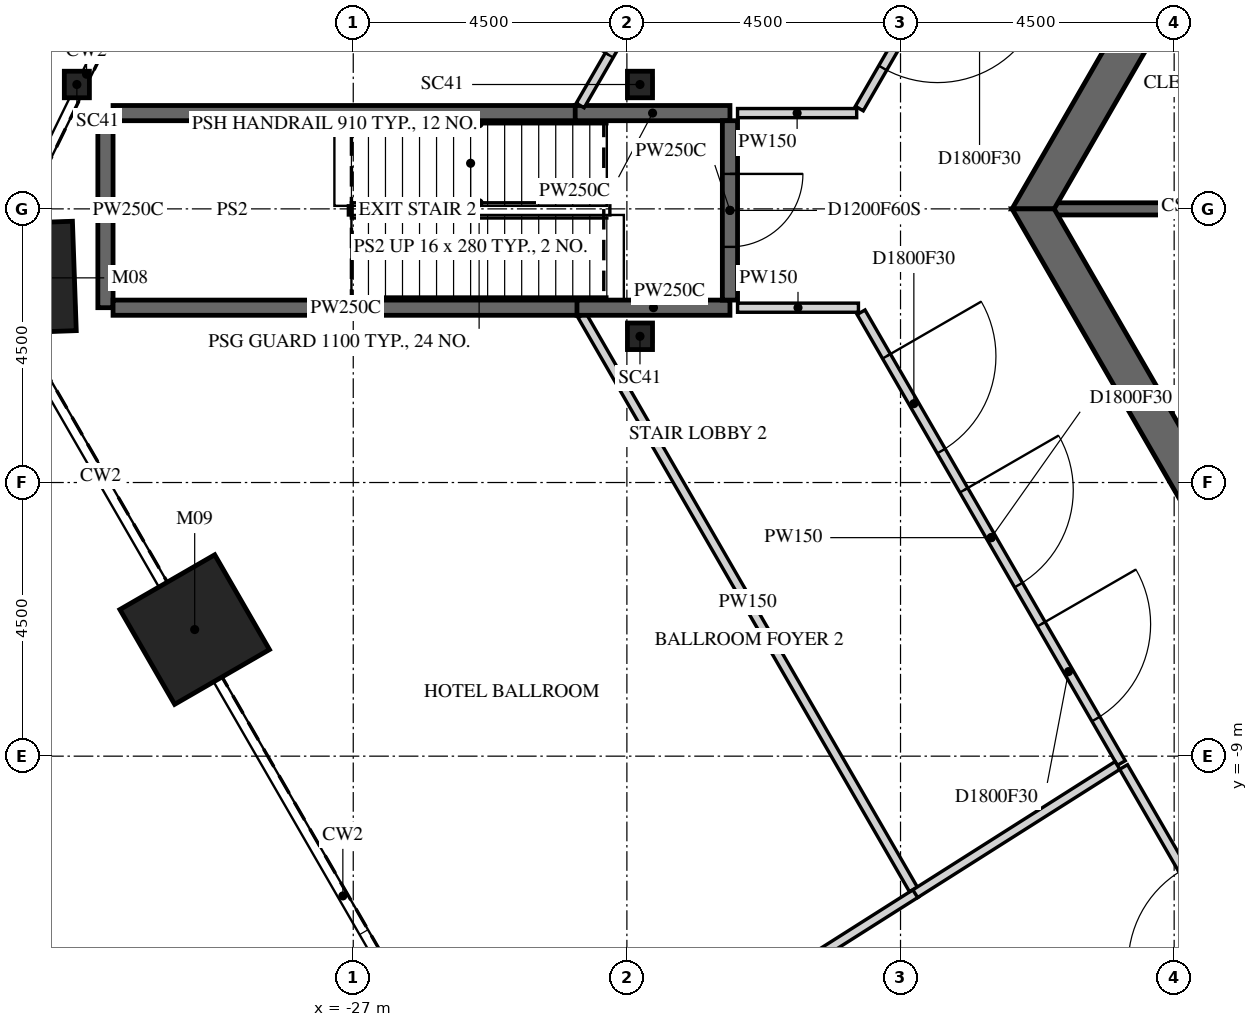
"""IFC4 building model, lengths in metres.
Left out: names, types, materials, properties, quantities, classifications, styles, units other than length and angle.
Written with IfcOpenShell. Run it as: python <this file> out.ifc"""

import sys

from ifc_helpers import new_model, si_unit, direction, frame, frame_2d, origin, origin_2d, place, context, subcontext, project, spatial, polyline, rectangle, i_section, outline, extrude, element, fill, save


model = new_model("IFC4")
c1 = context("Model", 3, precision=1e-05, world=origin(), true_north=direction((0.0, 1.0)))
c2 = subcontext(c1, "Body", "Model", "MODEL_VIEW")
j1 = project(units=[si_unit("LENGTHUNIT", "METRE"), si_unit("PLANEANGLEUNIT", "RADIAN")], contexts=[c1])
p1 = place(None, origin())
s1 = spatial("IfcSite", under=j1, at=p1, CompositionType="ELEMENT")
p2 = place(p1, origin())
s2 = spatial("IfcBuilding", under=s1, at=p2, CompositionType="ELEMENT")
p3 = place(p2, frame((0.0, 0.0, 15.0)))
s3 = spatial("IfcBuildingStorey", under=s2, at=p3, CompositionType="ELEMENT", Elevation=15.0)
for number, where, z_axis, x_axis in (
    (1, (-32.486, -1.135, -0.25), (0.0, 0.0, 1.0), (-0.035, 0.999, 0.0)),
    (2, (-29.608, -6.918, -0.25), (0.0, 0.0, 1.0), (-0.5, 0.866, 0.0)),
):
    element("IfcColumn", number, at=place(p3, frame(where, z_axis=z_axis, x_axis=x_axis)), inside=s3, PredefinedType="COLUMN", context=c2, shape_type="SweptSolid", body=[
        extrude(rectangle(XDim=1.8, YDim=1.8, at=origin_2d()), origin(), (0.0, 0.0, 1.0), 5.5),
    ])
for number, where, z_axis, x_axis in (
    (3, (-31.545, 2.045, -0.25), (0.0, 0.0, 1.0), (1.0, 0.0, 0.0)),
    (4, (-22.285, 2.045, -0.25), (0.0, 0.0, 1.0), (1.0, 0.0, 0.0)),
    (5, (-22.285, -2.095, -0.25), (0.0, 0.0, 1.0), (1.0, 0.0, 0.0)),
):
    element("IfcColumn", number, at=place(p3, frame(where, z_axis=z_axis, x_axis=x_axis)), inside=s3, PredefinedType="COLUMN", context=c2, shape_type="SweptSolid", body=[
        extrude(i_section(OverallWidth=0.412, OverallDepth=0.437, WebThickness=0.036, FlangeThickness=0.058, FilletRadius=0.015, at=origin_2d()), origin(), (0.0, 0.0, 1.0), 5.5),
    ])
p4 = place(p3, frame((-7.91, 13.7, -0.25), z_axis=(0.0, 0.0, 1.0), x_axis=(-0.499999880136, -0.866025472988, 0.0)))
e6 = element("IfcWall", 6, at=p4, inside=s3, PredefinedType="SHEAR", context=c2, shape_type="SweptSolid", body=[
    extrude(outline(polyline([(-0.173, -0.3), (15.993, -0.3), (15.646, 0.3), (0.173, 0.3), (-0.173, -0.3)])), origin(), (0.0, 0.0, 1.0), 5.5),
])
p5 = place(p4, frame((7.039, 0.0, 0.25)))
e7 = element("IfcOpeningElement", 7, at=p5, cuts=e6, PredefinedType="OPENING", context=c2, shape_type="SweptSolid", body=[
    extrude(rectangle(XDim=1.8, YDim=2.4, at=frame_2d((0.9, 1.2))), frame((0.0, 0.31, 0.0), z_axis=(0.0, -1.0, 0.0), x_axis=(1.0, 0.0, 0.0)), (0.0, 0.0, 1.0), 0.62),
])
p6 = place(p3, frame((-15.819, 0.0, -0.25), z_axis=(0.0, 0.0, 1.0), x_axis=(0.499999880136, -0.866025472988, 0.0)))
e8 = element("IfcWall", 8, at=p6, inside=s3, PredefinedType="SHEAR", context=c2, shape_type="SweptSolid", body=[
    extrude(outline(polyline([(-0.173, -0.3), (15.993, -0.3), (15.646, 0.3), (0.173, 0.3), (-0.173, -0.3)])), origin(), (0.0, 0.0, 1.0), 5.5),
])
p7 = place(p6, frame((6.981, 0.0, 0.25)))
e9 = element("IfcOpeningElement", 9, at=p7, cuts=e8, PredefinedType="OPENING", context=c2, shape_type="SweptSolid", body=[
    extrude(rectangle(XDim=1.8, YDim=2.4, at=frame_2d((0.9, 1.2))), frame((0.0, 0.31, 0.0), z_axis=(0.0, -1.0, 0.0), x_axis=(1.0, 0.0, 0.0)), (0.0, 0.0, 1.0), 0.62),
])
p8 = place(p3, frame((-11.547, 0.0, -0.25), z_axis=(0.0, 0.0, 1.0), x_axis=(-1.0, 0.0, 0.0)))
e10 = element("IfcWall", 10, at=p8, inside=s3, PredefinedType="SHEAR", context=c2, shape_type="SweptSolid", body=[
    extrude(rectangle(XDim=3.926, YDim=0.2, at=frame_2d((1.963, 0.0))), origin(), (0.0, 0.0, 1.0), 5.5),
])
p9 = place(p3, frame((-31.075, -1.625, 0.0), z_axis=(0.0, 0.0, 1.0), x_axis=(0.0, 1.0, 0.0)))
e11 = element("IfcWall", 11, at=p9, inside=s3, PredefinedType="PARTITIONING", context=c2, shape_type="SweptSolid", body=[
    extrude(rectangle(XDim=3.2, YDim=0.25, at=frame_2d((1.6, 0.0))), origin(), (0.0, 0.0, 1.0), 5.25),
])
p10 = place(p3, frame((-30.95, 1.575, 0.0), z_axis=(0.0, 0.0, 1.0), x_axis=(1.0, 0.0, 0.0)))
e12 = element("IfcWall", 12, at=p10, inside=s3, PredefinedType="PARTITIONING", context=c2, shape_type="SweptSolid", body=[
    extrude(rectangle(XDim=7.622, YDim=0.25, at=frame_2d((3.811, 0.0))), origin(), (0.0, 0.0, 1.0), 5.25),
])
p11 = place(p3, frame((-24.596, -15.599, 0.0), z_axis=(0.0, 0.0, 1.0), x_axis=(0.844468094915, 0.535605859445, 0.0)))
e13 = element("IfcWall", 13, at=p11, inside=s3, PredefinedType="PARTITIONING", context=c2, shape_type="SweptSolid", body=[
    extrude(rectangle(XDim=8.116, YDim=0.15, at=frame_2d((4.058, 0.0))), origin(), (0.0, 0.0, 1.0), 4.496),
])
p12 = place(p3, frame((-23.35, 1.575, 0.0), z_axis=(0.0, 0.0, 1.0), x_axis=(1.0, 0.0, 0.0)))
e14 = element("IfcWall", 14, at=p12, inside=s3, PredefinedType="PARTITIONING", context=c2, shape_type="SweptSolid", body=[
    extrude(rectangle(XDim=2.545, YDim=0.25, at=frame_2d((1.272, 0.0))), origin(), (0.0, 0.0, 1.0), 5.25),
])
p13 = place(p3, frame((-23.239, -1.75, 0.0), z_axis=(0.0, 0.0, 1.0), x_axis=(0.499992537871, -0.866029712004, 0.0)))
e15 = element("IfcWall", 15, at=p13, inside=s3, PredefinedType="PARTITIONING", context=c2, shape_type="SweptSolid", body=[
    extrude(rectangle(XDim=10.903, YDim=0.15, at=frame_2d((5.451, 0.0))), origin(), (0.0, 0.0, 1.0), 5.25),
])
p14 = place(p3, frame((-23.299, -1.625, 0.0), z_axis=(0.0, 0.0, 1.0), x_axis=(-1.0, 0.0, 0.0)))
e16 = element("IfcWall", 16, at=p14, inside=s3, PredefinedType="PARTITIONING", context=c2, shape_type="SweptSolid", body=[
    extrude(rectangle(XDim=7.651, YDim=0.25, at=frame_2d((3.825, 0.0))), origin(), (0.0, 0.0, 1.0), 5.25),
])
p15 = place(p3, frame((-20.805, -1.625, 0.0), z_axis=(0.0, 0.0, 1.0), x_axis=(-1.0, 0.0, 0.0)))
e17 = element("IfcWall", 17, at=p15, inside=s3, PredefinedType="PARTITIONING", context=c2, shape_type="SweptSolid", body=[
    extrude(rectangle(XDim=2.516, YDim=0.25, at=frame_2d((1.258, 0.0))), origin(), (0.0, 0.0, 1.0), 5.25),
])
p16 = place(p3, frame((-20.805, 1.45, 0.0), z_axis=(0.0, 0.0, 1.0), x_axis=(0.0, -1.0, 0.0)))
e18 = element("IfcWall", 18, at=p16, inside=s3, PredefinedType="PARTITIONING", context=c2, shape_type="SweptSolid", body=[
    extrude(rectangle(XDim=2.95, YDim=0.25, at=frame_2d((1.475, 0.0))), origin(), (0.0, 0.0, 1.0), 5.25),
])
p17 = place(p16, frame((0.875, 0.0, 0.0)))
e19 = element("IfcOpeningElement", 19, at=p17, cuts=e18, PredefinedType="OPENING", context=c2, shape_type="SweptSolid", body=[
    extrude(rectangle(XDim=1.2, YDim=2.1, at=frame_2d((0.6, 1.05))), frame((0.0, 0.135, 0.0), z_axis=(0.0, -1.0, 0.0), x_axis=(1.0, 0.0, 0.0)), (0.0, 0.0, 1.0), 0.27),
])
p18 = place(p3, frame((-20.68, 1.575, 0.0), z_axis=(0.0, 0.0, 1.0), x_axis=(1.0, 0.0, 0.0)))
e20 = element("IfcWall", 20, at=p18, inside=s3, PredefinedType="PARTITIONING", context=c2, shape_type="SweptSolid", body=[
    extrude(rectangle(XDim=1.959, YDim=0.15, at=frame_2d((0.979, 0.0))), origin(), (0.0, 0.0, 1.0), 5.25),
])
p19 = place(p3, frame((-18.692, -1.625, 0.0), z_axis=(0.0, 0.0, 1.0), x_axis=(-1.0, 0.0, 0.0)))
e21 = element("IfcWall", 21, at=p19, inside=s3, PredefinedType="PARTITIONING", context=c2, shape_type="SweptSolid", body=[
    extrude(rectangle(XDim=1.988, YDim=0.15, at=frame_2d((0.994, 0.0))), origin(), (0.0, 0.0, 1.0), 5.25),
])
p20 = place(p3, frame((-18.649, -1.7, 0.0), z_axis=(0.0, 0.0, 1.0), x_axis=(0.499985805234, -0.866033598981, 0.0)))
e22 = element("IfcWall", 22, at=p20, inside=s3, PredefinedType="PARTITIONING", context=c2, shape_type="SweptSolid", body=[
    extrude(rectangle(XDim=8.56, YDim=0.15, at=frame_2d((4.28, 0.0))), origin(), (0.0, 0.0, 1.0), 5.25),
])
p21 = place(p20, frame((0.836, 0.0, 0.0)))
e23 = element("IfcOpeningElement", 23, at=p21, cuts=e22, PredefinedType="OPENING", context=c2, shape_type="SweptSolid", body=[
    extrude(rectangle(XDim=1.8, YDim=2.1, at=frame_2d((0.9, 1.05))), frame((0.0, 0.085, 0.0), z_axis=(0.0, -1.0, 0.0), x_axis=(1.0, 0.0, 0.0)), (0.0, 0.0, 1.0), 0.17),
])
p22 = place(p20, frame((3.38, 0.0, 0.0)))
e24 = element("IfcOpeningElement", 24, at=p22, cuts=e22, PredefinedType="OPENING", context=c2, shape_type="SweptSolid", body=[
    extrude(rectangle(XDim=1.8, YDim=2.1, at=frame_2d((0.9, 1.05))), frame((0.0, 0.085, 0.0), z_axis=(0.0, -1.0, 0.0), x_axis=(1.0, 0.0, 0.0)), (0.0, 0.0, 1.0), 0.17),
])
p23 = place(p20, frame((5.924, 0.0, 0.0)))
e25 = element("IfcOpeningElement", 25, at=p23, cuts=e22, PredefinedType="OPENING", context=c2, shape_type="SweptSolid", body=[
    extrude(rectangle(XDim=1.8, YDim=2.1, at=frame_2d((0.9, 1.05))), frame((0.0, 0.085, 0.0), z_axis=(0.0, -1.0, 0.0), x_axis=(1.0, 0.0, 0.0)), (0.0, 0.0, 1.0), 0.17),
])
p24 = place(p3, frame((-17.758, -11.262, 0.0), z_axis=(0.0, 0.0, 1.0), x_axis=(0.844546191186, 0.53548270836, 0.0)))
e26 = element("IfcWall", 26, at=p24, inside=s3, PredefinedType="PARTITIONING", context=c2, shape_type="SweptSolid", body=[
    extrude(rectangle(XDim=3.938, YDim=0.15, at=frame_2d((1.969, 0.0))), origin(), (0.0, 0.0, 1.0), 4.496),
])
p25 = place(p3, frame((-23.268, 1.7, 0.0), z_axis=(0.0, 0.0, 1.0), x_axis=(0.500054871588, 0.86599372134, 0.0)))
e27 = element("IfcWall", 27, at=p25, inside=s3, PredefinedType="PARTITIONING", context=c2, shape_type="SweptSolid", body=[
    extrude(rectangle(XDim=11.634, YDim=0.15, at=frame_2d((5.817, 0.0))), origin(), (0.0, 0.0, 1.0), 5.25),
])
p26 = place(p25, frame((8.879, 0.0, 0.0)))
e28 = element("IfcOpeningElement", 28, at=p26, cuts=e27, PredefinedType="OPENING", context=c2, shape_type="SweptSolid", body=[
    extrude(rectangle(XDim=1.8, YDim=2.1, at=frame_2d((0.9, 1.05))), frame((0.0, 0.085, 0.0), z_axis=(0.0, -1.0, 0.0), x_axis=(1.0, 0.0, 0.0)), (0.0, 0.0, 1.0), 0.17),
])
p27 = place(p25, frame((6.804, 0.0, 0.0)))
e29 = element("IfcOpeningElement", 29, at=p27, cuts=e27, PredefinedType="OPENING", context=c2, shape_type="SweptSolid", body=[
    extrude(rectangle(XDim=1.8, YDim=2.1, at=frame_2d((0.9, 1.05))), frame((0.0, 0.085, 0.0), z_axis=(0.0, -1.0, 0.0), x_axis=(1.0, 0.0, 0.0)), (0.0, 0.0, 1.0), 0.17),
])
p28 = place(p25, frame((4.854, 0.0, 0.0)))
e30 = element("IfcOpeningElement", 30, at=p28, cuts=e27, PredefinedType="OPENING", context=c2, shape_type="SweptSolid", body=[
    extrude(rectangle(XDim=1.8, YDim=2.1, at=frame_2d((0.9, 1.05))), frame((0.0, 0.085, 0.0), z_axis=(0.0, -1.0, 0.0), x_axis=(1.0, 0.0, 0.0)), (0.0, 0.0, 1.0), 0.17),
])
p29 = place(p25, frame((2.904, 0.0, 0.0)))
e31 = element("IfcOpeningElement", 31, at=p29, cuts=e27, PredefinedType="OPENING", context=c2, shape_type="SweptSolid", body=[
    extrude(rectangle(XDim=1.8, YDim=2.1, at=frame_2d((0.9, 1.05))), frame((0.0, 0.085, 0.0), z_axis=(0.0, -1.0, 0.0), x_axis=(1.0, 0.0, 0.0)), (0.0, 0.0, 1.0), 0.17),
])
p30 = place(p25, frame((0.955, 0.0, 0.0)))
e32 = element("IfcOpeningElement", 32, at=p30, cuts=e27, PredefinedType="OPENING", context=c2, shape_type="SweptSolid", body=[
    extrude(rectangle(XDim=1.8, YDim=2.1, at=frame_2d((0.9, 1.05))), frame((0.0, 0.085, 0.0), z_axis=(0.0, -1.0, 0.0), x_axis=(1.0, 0.0, 0.0)), (0.0, 0.0, 1.0), 0.17),
])
p31 = place(p3, frame((-14.723, 8.5, 0.0), z_axis=(0.0, 0.0, 1.0), x_axis=(-0.499993197506, -0.86602933117, 0.0)))
e33 = element("IfcWall", 33, at=p31, inside=s3, PredefinedType="PARTITIONING", context=c2, shape_type="SweptSolid", body=[
    extrude(rectangle(XDim=7.91, YDim=0.15, at=frame_2d((3.955, 0.0))), origin(), (0.0, 0.0, 1.0), 5.25),
])
p32 = place(p31, frame((0.771, 0.0, 0.0)))
e34 = element("IfcOpeningElement", 34, at=p32, cuts=e33, PredefinedType="OPENING", context=c2, shape_type="SweptSolid", body=[
    extrude(rectangle(XDim=1.8, YDim=2.1, at=frame_2d((0.9, 1.05))), frame((0.0, 0.085, 0.0), z_axis=(0.0, -1.0, 0.0), x_axis=(1.0, 0.0, 0.0)), (0.0, 0.0, 1.0), 0.17),
])
p33 = place(p31, frame((3.055, 0.0, 0.0)))
e35 = element("IfcOpeningElement", 35, at=p33, cuts=e33, PredefinedType="OPENING", context=c2, shape_type="SweptSolid", body=[
    extrude(rectangle(XDim=1.8, YDim=2.1, at=frame_2d((0.9, 1.05))), frame((0.0, 0.085, 0.0), z_axis=(0.0, -1.0, 0.0), x_axis=(1.0, 0.0, 0.0)), (0.0, 0.0, 1.0), 0.17),
])
p34 = place(p31, frame((5.339, 0.0, 0.0)))
e36 = element("IfcOpeningElement", 36, at=p34, cuts=e33, PredefinedType="OPENING", context=c2, shape_type="SweptSolid", body=[
    extrude(rectangle(XDim=1.8, YDim=2.1, at=frame_2d((0.9, 1.05))), frame((0.0, 0.085, 0.0), z_axis=(0.0, -1.0, 0.0), x_axis=(1.0, 0.0, 0.0)), (0.0, 0.0, 1.0), 0.17),
])
p35 = place(p3, frame((-11.481, -14.114, 0.0), z_axis=(0.0, 0.0, 1.0), x_axis=(-0.500049947645, 0.865996564577, 0.0)))
e37 = element("IfcWall", 37, at=p35, inside=s3, PredefinedType="PARTITIONING", context=c2, shape_type="SweptSolid", body=[
    extrude(rectangle(XDim=5.7, YDim=0.15, at=frame_2d((2.85, 0.0))), origin(), (0.0, 0.0, 1.0), 5.25),
])
p36 = place(p35, frame((1.95, 0.0, 0.0)))
e38 = element("IfcOpeningElement", 38, at=p36, cuts=e37, PredefinedType="OPENING", context=c2, shape_type="SweptSolid", body=[
    extrude(rectangle(XDim=1.8, YDim=2.1, at=frame_2d((0.9, 1.05))), frame((0.0, 0.085, 0.0), z_axis=(0.0, -1.0, 0.0), x_axis=(1.0, 0.0, 0.0)), (0.0, 0.0, 1.0), 0.17),
])
p37 = place(p17, origin())
e39 = element("IfcDoor", 39, at=p37, inside=s3, OperationType="SINGLE_SWING_RIGHT", PredefinedType="DOOR", context=c2, shape_type="SweptSolid", body=[
    extrude(rectangle(XDim=1.2, YDim=2.1, at=frame_2d((0.6, 1.05))), frame((0.0, 0.025, 0.0), z_axis=(0.0, -1.0, 0.0), x_axis=(1.0, 0.0, 0.0)), (0.0, 0.0, 1.0), 0.05),
])
fill(e19, e39)
p38 = place(p21, origin())
e40 = element("IfcDoor", 40, at=p38, inside=s3, OperationType="DOUBLE_DOOR_SINGLE_SWING", PredefinedType="DOOR", context=c2, shape_type="SweptSolid", body=[
    extrude(rectangle(XDim=1.8, YDim=2.1, at=frame_2d((0.9, 1.05))), frame((0.0, 0.025, 0.0), z_axis=(0.0, -1.0, 0.0), x_axis=(1.0, 0.0, 0.0)), (0.0, 0.0, 1.0), 0.05),
])
fill(e23, e40)
p39 = place(p22, origin())
e41 = element("IfcDoor", 41, at=p39, inside=s3, OperationType="DOUBLE_DOOR_SINGLE_SWING", PredefinedType="DOOR", context=c2, shape_type="SweptSolid", body=[
    extrude(rectangle(XDim=1.8, YDim=2.1, at=frame_2d((0.9, 1.05))), frame((0.0, 0.025, 0.0), z_axis=(0.0, -1.0, 0.0), x_axis=(1.0, 0.0, 0.0)), (0.0, 0.0, 1.0), 0.05),
])
fill(e24, e41)
p40 = place(p23, origin())
e42 = element("IfcDoor", 42, at=p40, inside=s3, OperationType="DOUBLE_DOOR_SINGLE_SWING", PredefinedType="DOOR", context=c2, shape_type="SweptSolid", body=[
    extrude(rectangle(XDim=1.8, YDim=2.1, at=frame_2d((0.9, 1.05))), frame((0.0, 0.025, 0.0), z_axis=(0.0, -1.0, 0.0), x_axis=(1.0, 0.0, 0.0)), (0.0, 0.0, 1.0), 0.05),
])
fill(e25, e42)
p41 = place(p30, origin())
e43 = element("IfcDoor", 43, at=p41, inside=s3, OperationType="DOUBLE_DOOR_SINGLE_SWING", PredefinedType="DOOR", context=c2, shape_type="SweptSolid", body=[
    extrude(rectangle(XDim=1.8, YDim=2.1, at=frame_2d((0.9, 1.05))), frame((0.0, 0.025, 0.0), z_axis=(0.0, -1.0, 0.0), x_axis=(1.0, 0.0, 0.0)), (0.0, 0.0, 1.0), 0.05),
])
fill(e32, e43)
p42 = place(p34, origin())
e44 = element("IfcDoor", 44, at=p42, inside=s3, OperationType="DOUBLE_DOOR_SINGLE_SWING", PredefinedType="DOOR", context=c2, shape_type="SweptSolid", body=[
    extrude(rectangle(XDim=1.8, YDim=2.1, at=frame_2d((0.9, 1.05))), frame((0.0, 0.025, 0.0), z_axis=(0.0, -1.0, 0.0), x_axis=(1.0, 0.0, 0.0)), (0.0, 0.0, 1.0), 0.05),
])
fill(e36, e44)
save(model, sys.argv[1])
